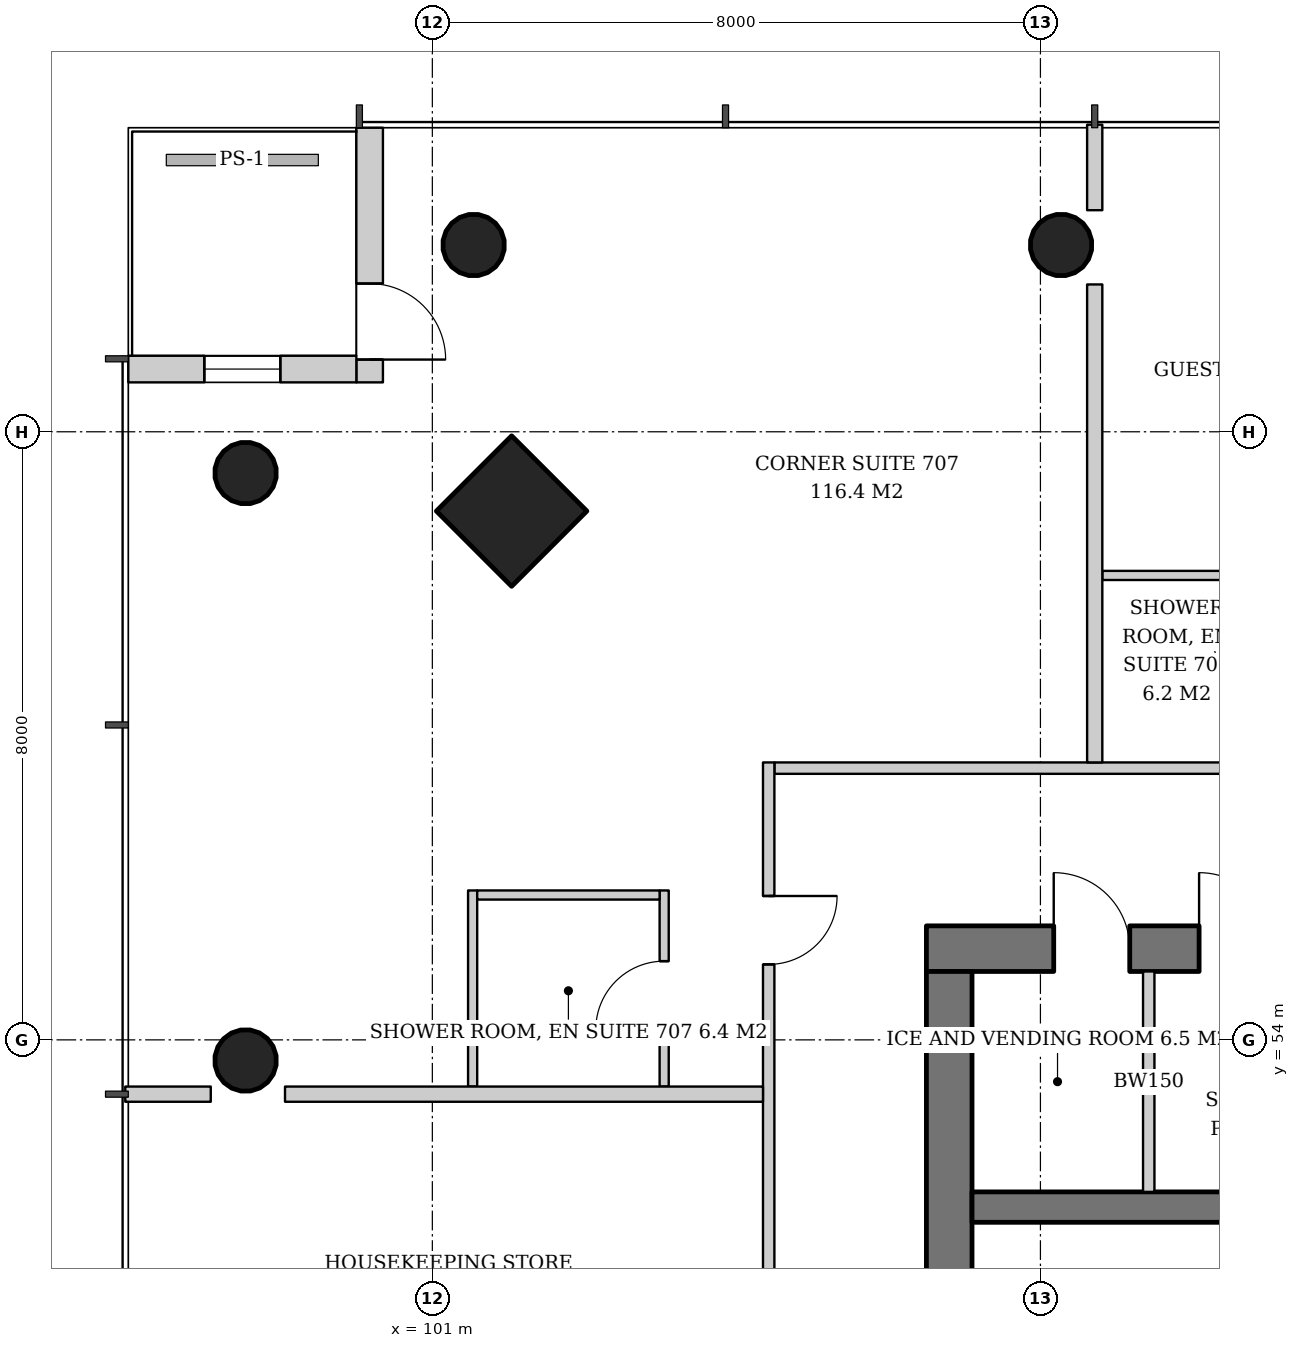
"""IFC4 building model, lengths in metres.
Left out: names, types, materials, properties, quantities, classifications, styles, units other than length and angle.
Written with IfcOpenShell. Run it as: python <this file> out.ifc"""

import sys

from ifc_helpers import new_model, si_unit, direction, frame, frame_2d, origin, origin_2d, place, context, subcontext, project, spatial, rectangle, hollow_circle, extrude, element, fill, save


model = new_model("IFC4")
c1 = context("Model", 3, precision=1e-05, world=origin(), true_north=direction((0.0, 1.0)))
c2 = subcontext(c1, "Body", "Model", "MODEL_VIEW")
j1 = project(units=[si_unit("LENGTHUNIT", "METRE"), si_unit("PLANEANGLEUNIT", "RADIAN")], contexts=[c1])
p1 = place(None, origin())
s1 = spatial("IfcSite", under=j1, at=p1, CompositionType="ELEMENT")
p2 = place(p1, origin())
s2 = spatial("IfcBuilding", under=s1, at=p2, CompositionType="ELEMENT")
p3 = place(p2, frame((0.0, 0.0, 32.4)))
s3 = spatial("IfcBuildingStorey", under=s2, at=p3, CompositionType="ELEMENT", Elevation=32.4)
p4 = place(p3, frame((101.991, 61.009, 0.0), z_axis=(0.043029647111, -0.043029647111, 0.998146732169), x_axis=(0.707106781187, 0.707106781187, 0.0)))
e1 = element("IfcColumn", 1, at=p4, inside=s3, PredefinedType="COLUMN", context=c2, shape_type="SweptSolid", body=[
    extrude(rectangle(XDim=1.4, YDim=1.4, at=origin_2d()), origin(), (0.0, 0.0, 1.0), 3.807),
])
p5 = place(p3, frame((101.491, 64.509, 0.0), z_axis=(0.043029647111, -0.043029647111, 0.998146732169), x_axis=(0.707106781187, 0.707106781187, 0.0)))
e2 = element("IfcColumn", 2, at=p5, inside=s3, PredefinedType="COLUMN", context=c2, shape_type="SweptSolid", body=[
    extrude(hollow_circle(Radius=0.406, WallThickness=0.03, at=origin_2d()), origin(), (0.0, 0.0, 1.0), 3.807),
])
p6 = place(p3, frame((109.246, 64.509, 0.0), z_axis=(0.021561848751, -0.043059525333, 0.998839808957), x_axis=(0.894160516368, 0.44774654769, 0.0)))
e3 = element("IfcColumn", 3, at=p6, inside=s3, PredefinedType="COLUMN", context=c2, shape_type="SweptSolid", body=[
    extrude(hollow_circle(Radius=0.406, WallThickness=0.03, at=origin_2d()), origin(), (0.0, 0.0, 1.0), 3.804),
])
p7 = place(p3, frame((98.491, 61.509, 0.0), z_axis=(0.043029647111, -0.043029647111, 0.998146732169), x_axis=(0.707106781187, 0.707106781187, 0.0)))
e4 = element("IfcColumn", 4, at=p7, inside=s3, PredefinedType="COLUMN", context=c2, shape_type="SweptSolid", body=[
    extrude(hollow_circle(Radius=0.406, WallThickness=0.03, at=origin_2d()), origin(), (0.0, 0.0, 1.0), 3.807),
])
p8 = place(p3, frame((98.491, 53.754, 0.0), z_axis=(0.043059525333, -0.021561848751, 0.998839808957), x_axis=(0.44774654769, 0.894160516368, 0.0)))
e5 = element("IfcColumn", 5, at=p8, inside=s3, PredefinedType="COLUMN", context=c2, shape_type="SweptSolid", body=[
    extrude(hollow_circle(Radius=0.406, WallThickness=0.03, at=origin_2d()), origin(), (0.0, 0.0, 1.0), 3.804),
])
p9 = place(p3, frame((107.5, 55.2, 0.0), z_axis=(0.0, 0.0, 1.0), x_axis=(1.0, 0.0, 0.0)))
e6 = element("IfcWall", 6, at=p9, inside=s3, PredefinedType="SHEAR", context=c2, shape_type="SweptSolid", body=[
    extrude(rectangle(XDim=19.0, YDim=0.6, at=frame_2d((9.5, 0.0))), origin(), (0.0, 0.0, 1.0), 3.8),
])
p10 = place(p9, frame((14.14, 0.0, 0.0)))
e7 = element("IfcOpeningElement", 7, at=p10, cuts=e6, PredefinedType="OPENING", context=c2, shape_type="SweptSolid", body=[
    extrude(rectangle(XDim=1.0, YDim=2.1, at=frame_2d((0.5, 1.05))), frame((0.0, 0.31, 0.0), z_axis=(0.0, -1.0, 0.0), x_axis=(1.0, 0.0, 0.0)), (0.0, 0.0, 1.0), 0.62),
])
p11 = place(p9, frame((1.675, 0.0, 0.0)))
e8 = element("IfcOpeningElement", 8, at=p11, cuts=e6, PredefinedType="OPENING", context=c2, shape_type="SweptSolid", body=[
    extrude(rectangle(XDim=1.0, YDim=2.1, at=frame_2d((0.5, 1.05))), frame((0.0, 0.31, 0.0), z_axis=(0.0, -1.0, 0.0), x_axis=(1.0, 0.0, 0.0)), (0.0, 0.0, 1.0), 0.62),
])
p12 = place(p9, frame((3.587, 0.0, 0.0)))
e9 = element("IfcOpeningElement", 9, at=p12, cuts=e6, PredefinedType="OPENING", context=c2, shape_type="SweptSolid", body=[
    extrude(rectangle(XDim=1.0, YDim=2.1, at=frame_2d((0.5, 1.05))), frame((0.0, 0.31, 0.0), z_axis=(0.0, -1.0, 0.0), x_axis=(1.0, 0.0, 0.0)), (0.0, 0.0, 1.0), 0.62),
])
p13 = place(p3, frame((107.8, 37.1, 0.0), z_axis=(0.0, 0.0, 1.0), x_axis=(0.0, 1.0, 0.0)))
e10 = element("IfcWall", 10, at=p13, inside=s3, PredefinedType="SHEAR", context=c2, shape_type="SweptSolid", body=[
    extrude(rectangle(XDim=17.8, YDim=0.6, at=frame_2d((8.9, 0.0))), origin(), (0.0, 0.0, 1.0), 3.8),
])
p14 = place(p13, frame((8.0, 0.0, 0.0)))
e11 = element("IfcOpeningElement", 11, at=p14, cuts=e10, PredefinedType="OPENING", context=c2, shape_type="SweptSolid", body=[
    extrude(rectangle(XDim=1.8, YDim=2.4, at=frame_2d((0.9, 1.2))), frame((0.0, 0.31, 0.0), z_axis=(0.0, -1.0, 0.0), x_axis=(1.0, 0.0, 0.0)), (0.0, 0.0, 1.0), 0.62),
])
p15 = place(p3, frame((108.1, 51.8, 0.0), z_axis=(0.0, 0.0, 1.0), x_axis=(1.0, 0.0, 0.0)))
e12 = element("IfcWall", 12, at=p15, inside=s3, PredefinedType="SHEAR", context=c2, shape_type="SweptSolid", body=[
    extrude(rectangle(XDim=17.8, YDim=0.4, at=frame_2d((8.9, 0.0))), origin(), (0.0, 0.0, 1.0), 3.8),
])
p16 = place(p3, frame((100.175, 66.0, 0.0), z_axis=(0.0, 0.0, 1.0), x_axis=(0.0, -1.0, 0.0)))
e13 = element("IfcWall", 13, at=p16, inside=s3, PredefinedType="SOLIDWALL", context=c2, shape_type="SweptSolid", body=[
    extrude(rectangle(XDim=3.35, YDim=0.35, at=frame_2d((1.675, 0.0))), origin(), (0.0, 0.0, 1.0), 3.6),
])
p17 = place(p16, frame((2.05, 0.0, 0.0)))
e14 = element("IfcOpeningElement", 14, at=p17, cuts=e13, PredefinedType="OPENING", context=c2, shape_type="SweptSolid", body=[
    extrude(rectangle(XDim=1.0, YDim=2.4, at=frame_2d((0.5, 1.2))), frame((0.0, 0.185, 0.0), z_axis=(0.0, -1.0, 0.0), x_axis=(1.0, 0.0, 0.0)), (0.0, 0.0, 1.0), 0.37),
])
p18 = place(p3, frame((100.0, 62.825, 0.0), z_axis=(0.0, 0.0, 1.0), x_axis=(-1.0, 0.0, 0.0)))
e15 = element("IfcWall", 15, at=p18, inside=s3, PredefinedType="SOLIDWALL", context=c2, shape_type="SweptSolid", body=[
    extrude(rectangle(XDim=3.0, YDim=0.35, at=frame_2d((1.5, 0.0))), origin(), (0.0, 0.0, 1.0), 3.6),
])
p19 = place(p18, frame((1.0, 0.0, 0.9)))
e16 = element("IfcOpeningElement", 16, at=p19, cuts=e15, PredefinedType="OPENING", context=c2, shape_type="SweptSolid", body=[
    extrude(rectangle(XDim=1.0, YDim=2.4, at=frame_2d((0.5, 1.2))), frame((0.0, 0.185, 0.0), z_axis=(0.0, -1.0, 0.0), x_axis=(1.0, 0.0, 0.0)), (0.0, 0.0, 1.0), 0.37),
])
p20 = place(p3, frame((110.425, 52.0, 0.0), z_axis=(0.0, 0.0, 1.0), x_axis=(0.0, 1.0, 0.0)))
e17 = element("IfcWall", 17, at=p20, inside=s3, PredefinedType="SOLIDWALL", context=c2, shape_type="SweptSolid", body=[
    extrude(rectangle(XDim=2.9, YDim=0.15, at=frame_2d((1.45, 0.0))), origin(), (0.0, 0.0, 1.0), 3.6),
])
p21 = place(p3, frame((112.234, 60.11, 0.0), z_axis=(0.0, 0.0, 1.0), x_axis=(-1.0, 0.0, 0.0)))
e18 = element("IfcWall", 18, at=p21, inside=s3, PredefinedType="PARTITIONING", context=c2, shape_type="SweptSolid", body=[
    extrude(rectangle(XDim=2.42, YDim=0.12, at=frame_2d((1.21, 0.0))), origin(), (0.0, 0.0, 1.0), 2.847),
])
p22 = place(p3, frame((128.65, 57.575, 0.0), z_axis=(0.0, 0.0, 1.0), x_axis=(-1.0, 0.0, 0.0)))
e19 = element("IfcWall", 19, at=p22, inside=s3, PredefinedType="PARTITIONING", context=c2, shape_type="SweptSolid", body=[
    extrude(rectangle(XDim=23.15, YDim=0.15, at=frame_2d((11.575, 0.0))), origin(), (0.0, 0.0, 1.0), 2.8),
])
p23 = place(p22, frame((1.757, 0.0, 0.0)))
e20 = element("IfcOpeningElement", 20, at=p23, cuts=e19, PredefinedType="OPENING", context=c2, shape_type="SweptSolid", body=[
    extrude(rectangle(XDim=0.9, YDim=2.1, at=frame_2d((0.45, 1.05))), frame((0.0, 0.085, 0.0), z_axis=(0.0, -1.0, 0.0), x_axis=(1.0, 0.0, 0.0)), (0.0, 0.0, 1.0), 0.17),
])
p24 = place(p22, frame((5.572, 0.0, 0.0)))
e21 = element("IfcOpeningElement", 21, at=p24, cuts=e19, PredefinedType="OPENING", context=c2, shape_type="SweptSolid", body=[
    extrude(rectangle(XDim=0.9, YDim=2.1, at=frame_2d((0.45, 1.05))), frame((0.0, 0.085, 0.0), z_axis=(0.0, -1.0, 0.0), x_axis=(1.0, 0.0, 0.0)), (0.0, 0.0, 1.0), 0.17),
])
p25 = place(p22, frame((11.971, 0.0, 0.0)))
e22 = element("IfcOpeningElement", 22, at=p25, cuts=e19, PredefinedType="OPENING", context=c2, shape_type="SweptSolid", body=[
    extrude(rectangle(XDim=0.9, YDim=2.1, at=frame_2d((0.45, 1.05))), frame((0.0, 0.085, 0.0), z_axis=(0.0, -1.0, 0.0), x_axis=(1.0, 0.0, 0.0)), (0.0, 0.0, 1.0), 0.17),
])
p26 = place(p22, frame((15.286, 0.0, 0.0)))
e23 = element("IfcOpeningElement", 23, at=p26, cuts=e19, PredefinedType="OPENING", context=c2, shape_type="SweptSolid", body=[
    extrude(rectangle(XDim=0.9, YDim=2.1, at=frame_2d((0.45, 1.05))), frame((0.0, 0.085, 0.0), z_axis=(0.0, -1.0, 0.0), x_axis=(1.0, 0.0, 0.0)), (0.0, 0.0, 1.0), 0.17),
])
p27 = place(p3, frame((109.714, 57.65, 0.0), z_axis=(0.0, 0.0, 1.0), x_axis=(0.0, 1.0, 0.0)))
e24 = element("IfcWall", 24, at=p27, inside=s3, PredefinedType="PARTITIONING", context=c2, shape_type="SweptSolid", body=[
    extrude(rectangle(XDim=6.288, YDim=0.2, at=frame_2d((3.144, 0.0))), origin(), (0.0, 0.0, 1.0), 3.6),
])
p28 = place(p3, frame((109.714, 64.915, 0.0), z_axis=(0.0, 0.0, 1.0), x_axis=(0.0, 1.0, 0.0)))
e25 = element("IfcWall", 25, at=p28, inside=s3, PredefinedType="PARTITIONING", context=c2, shape_type="SweptSolid", body=[
    extrude(rectangle(XDim=1.125, YDim=0.2, at=frame_2d((0.562, 0.0))), origin(), (0.0, 0.0, 1.0), 3.6),
])
p29 = place(p3, frame((104.05, 53.386, 0.0), z_axis=(0.0, 0.0, 1.0), x_axis=(0.0, 1.0, 0.0)))
e26 = element("IfcWall", 26, at=p29, inside=s3, PredefinedType="PARTITIONING", context=c2, shape_type="SweptSolid", body=[
    extrude(rectangle(XDim=2.58, YDim=0.12, at=frame_2d((1.29, 0.0))), origin(), (0.0, 0.0, 1.0), 2.8),
])
p30 = place(p29, frame((0.75, 0.0, 0.0)))
e27 = element("IfcOpeningElement", 27, at=p30, cuts=e26, PredefinedType="OPENING", context=c2, shape_type="SweptSolid", body=[
    extrude(rectangle(XDim=0.9, YDim=2.1, at=frame_2d((0.45, 1.05))), frame((0.0, 0.07, 0.0), z_axis=(0.0, -1.0, 0.0), x_axis=(1.0, 0.0, 0.0)), (0.0, 0.0, 1.0), 0.14),
])
p31 = place(p3, frame((101.53, 53.386, 0.0), z_axis=(0.0, 0.0, 1.0), x_axis=(0.0, 1.0, 0.0)))
e28 = element("IfcWall", 28, at=p31, inside=s3, PredefinedType="PARTITIONING", context=c2, shape_type="SweptSolid", body=[
    extrude(rectangle(XDim=2.58, YDim=0.12, at=frame_2d((1.29, 0.0))), origin(), (0.0, 0.0, 1.0), 2.8),
])
p32 = place(p3, frame((103.99, 55.906, 0.0), z_axis=(0.0, 0.0, 1.0), x_axis=(-1.0, 0.0, 0.0)))
e29 = element("IfcWall", 29, at=p32, inside=s3, PredefinedType="PARTITIONING", context=c2, shape_type="SweptSolid", body=[
    extrude(rectangle(XDim=2.4, YDim=0.12, at=frame_2d((1.2, 0.0))), origin(), (0.0, 0.0, 1.0), 2.847),
])
p33 = place(p3, frame((105.425, 57.65, 0.0), z_axis=(0.0, 0.0, 1.0), x_axis=(0.0, -1.0, 0.0)))
e30 = element("IfcWall", 30, at=p33, inside=s3, PredefinedType="PARTITIONING", context=c2, shape_type="SweptSolid", body=[
    extrude(rectangle(XDim=23.15, YDim=0.15, at=frame_2d((11.575, 0.0))), origin(), (0.0, 0.0, 1.0), 2.8),
])
p34 = place(p33, frame((1.757, 0.0, 0.0)))
e31 = element("IfcOpeningElement", 31, at=p34, cuts=e30, PredefinedType="OPENING", context=c2, shape_type="SweptSolid", body=[
    extrude(rectangle(XDim=0.9, YDim=2.1, at=frame_2d((0.45, 1.05))), frame((0.0, 0.085, 0.0), z_axis=(0.0, -1.0, 0.0), x_axis=(1.0, 0.0, 0.0)), (0.0, 0.0, 1.0), 0.17),
])
p35 = place(p33, frame((7.064, 0.0, 0.0)))
e32 = element("IfcOpeningElement", 32, at=p35, cuts=e30, PredefinedType="OPENING", context=c2, shape_type="SweptSolid", body=[
    extrude(rectangle(XDim=1.0, YDim=2.1, at=frame_2d((0.5, 1.05))), frame((0.0, 0.085, 0.0), z_axis=(0.0, -1.0, 0.0), x_axis=(1.0, 0.0, 0.0)), (0.0, 0.0, 1.0), 0.17),
])
p36 = place(p33, frame((11.971, 0.0, 0.0)))
e33 = element("IfcOpeningElement", 33, at=p36, cuts=e30, PredefinedType="OPENING", context=c2, shape_type="SweptSolid", body=[
    extrude(rectangle(XDim=0.9, YDim=2.1, at=frame_2d((0.45, 1.05))), frame((0.0, 0.085, 0.0), z_axis=(0.0, -1.0, 0.0), x_axis=(1.0, 0.0, 0.0)), (0.0, 0.0, 1.0), 0.17),
])
p37 = place(p3, frame((105.35, 53.286, 0.0), z_axis=(0.0, 0.0, 1.0), x_axis=(-1.0, 0.0, 0.0)))
e34 = element("IfcWall", 34, at=p37, inside=s3, PredefinedType="PARTITIONING", context=c2, shape_type="SweptSolid", body=[
    extrude(rectangle(XDim=6.288, YDim=0.2, at=frame_2d((3.144, 0.0))), origin(), (0.0, 0.0, 1.0), 3.6),
])
p38 = place(p3, frame((98.085, 53.286, 0.0), z_axis=(0.0, 0.0, 1.0), x_axis=(-1.0, 0.0, 0.0)))
e35 = element("IfcWall", 35, at=p38, inside=s3, PredefinedType="PARTITIONING", context=c2, shape_type="SweptSolid", body=[
    extrude(rectangle(XDim=1.125, YDim=0.2, at=frame_2d((0.562, 0.0))), origin(), (0.0, 0.0, 1.0), 3.6),
])
p39 = place(p17, origin())
e36 = element("IfcDoor", 36, at=p39, inside=s3, OperationType="SINGLE_SWING_RIGHT", PredefinedType="DOOR", context=c2, shape_type="SweptSolid", body=[
    extrude(rectangle(XDim=1.0, YDim=2.4, at=frame_2d((0.5, 1.2))), frame((0.0, 0.025, 0.0), z_axis=(0.0, -1.0, 0.0), x_axis=(1.0, 0.0, 0.0)), (0.0, 0.0, 1.0), 0.05),
])
fill(e14, e36)
p40 = place(p19, origin())
e37 = element("IfcWindow", 37, at=p40, inside=s3, PartitioningType="SINGLE_PANEL", PredefinedType="WINDOW", context=c2, shape_type="SweptSolid", body=[
    extrude(rectangle(XDim=1.0, YDim=2.4, at=frame_2d((0.5, 1.2))), frame((0.0, 0.03, 0.0), z_axis=(0.0, -1.0, 0.0), x_axis=(1.0, 0.0, 0.0)), (0.0, 0.0, 1.0), 0.06),
])
fill(e16, e37)
p41 = place(p11, origin())
e38 = element("IfcDoor", 38, at=p41, inside=s3, OperationType="SINGLE_SWING_LEFT", PredefinedType="DOOR", context=c2, shape_type="SweptSolid", body=[
    extrude(rectangle(XDim=1.0, YDim=2.1, at=frame_2d((0.5, 1.05))), frame((0.0, -0.24, 0.0), z_axis=(0.0, -1.0, 0.0), x_axis=(1.0, 0.0, 0.0)), (0.0, 0.0, 1.0), 0.05),
])
fill(e8, e38)
p42 = place(p12, origin())
e39 = element("IfcDoor", 39, at=p42, inside=s3, OperationType="SINGLE_SWING_LEFT", PredefinedType="DOOR", context=c2, shape_type="SweptSolid", body=[
    extrude(rectangle(XDim=1.0, YDim=2.1, at=frame_2d((0.5, 1.05))), frame((0.0, -0.24, 0.0), z_axis=(0.0, -1.0, 0.0), x_axis=(1.0, 0.0, 0.0)), (0.0, 0.0, 1.0), 0.05),
])
fill(e9, e39)
p43 = place(p30, origin())
e40 = element("IfcDoor", 40, at=p43, inside=s3, OperationType="SINGLE_SWING_LEFT", PredefinedType="DOOR", context=c2, shape_type="SweptSolid", body=[
    extrude(rectangle(XDim=0.9, YDim=2.1, at=frame_2d((0.45, 1.05))), frame((0.0, 0.025, 0.0), z_axis=(0.0, -1.0, 0.0), x_axis=(1.0, 0.0, 0.0)), (0.0, 0.0, 1.0), 0.05),
])
fill(e27, e40)
p44 = place(p34, origin())
e41 = element("IfcDoor", 41, at=p44, inside=s3, OperationType="SINGLE_SWING_LEFT", PredefinedType="DOOR", context=c2, shape_type="SweptSolid", body=[
    extrude(rectangle(XDim=0.9, YDim=2.1, at=frame_2d((0.45, 1.05))), frame((0.0, 0.025, 0.0), z_axis=(0.0, -1.0, 0.0), x_axis=(1.0, 0.0, 0.0)), (0.0, 0.0, 1.0), 0.05),
])
fill(e31, e41)
save(model, sys.argv[1])
